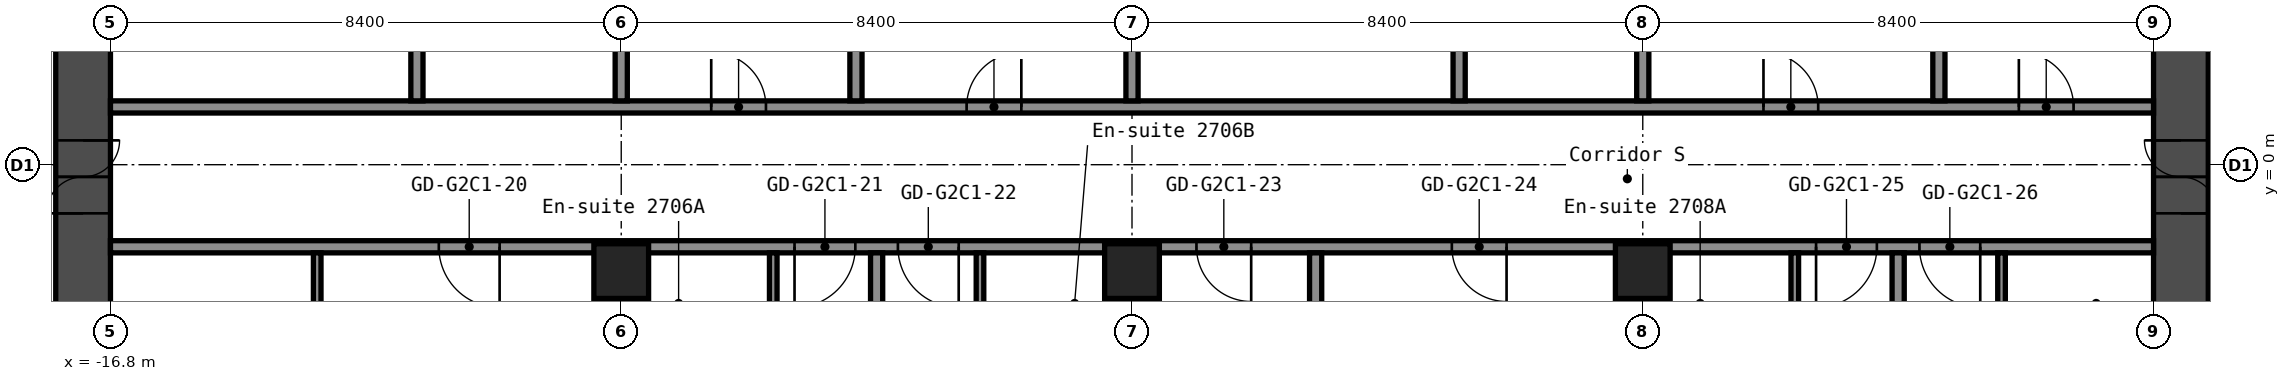
"""IFC4 building model, lengths in metres.
Left out: names, types, materials, properties, quantities, classifications, styles, units other than length and angle.
Written with IfcOpenShell. Run it as: python <this file> out.ifc"""

import sys

from ifc_helpers import new_model, si_unit, direction, frame, frame_2d, origin, origin_2d, place, context, subcontext, project, spatial, rectangle, hollow_rectangle, extrude, element, fill, save


model = new_model("IFC4")
c1 = context("Model", 3, precision=1e-05, world=origin(), true_north=direction((0.0, 1.0)))
c2 = subcontext(c1, "Body", "Model", "MODEL_VIEW")
j1 = project(units=[si_unit("LENGTHUNIT", "METRE"), si_unit("PLANEANGLEUNIT", "RADIAN")], contexts=[c1])
p1 = place(None, origin())
s1 = spatial("IfcSite", under=j1, at=p1, CompositionType="ELEMENT")
p2 = place(p1, origin())
s2 = spatial("IfcBuilding", under=s1, at=p2, CompositionType="ELEMENT")
p3 = place(p2, frame((0.0, 0.0, 97.8)))
s3 = spatial("IfcBuildingStorey", under=s2, at=p3, CompositionType="ELEMENT", Elevation=97.8)
for number, where, z_axis, x_axis in (
    (1, (-8.4, -1.75, 0.0), (0.0, 0.0, 1.0), (1.0, 0.0, 0.0)),
    (2, (0.0, -1.75, 0.0), (0.0, 0.0, 1.0), (1.0, 0.0, 0.0)),
    (3, (8.4, -1.75, 0.0), (0.0, 0.0, 1.0), (1.0, 0.0, 0.0)),
):
    element("IfcColumn", number, at=place(p3, frame(where, z_axis=z_axis, x_axis=x_axis)), inside=s3, PredefinedType="COLUMN", context=c2, shape_type="SweptSolid", body=[
        extrude(hollow_rectangle(XDim=0.9, YDim=0.9, WallThickness=0.036, at=origin_2d()), origin(), (0.0, 0.0, 1.0), 2.8),
    ])
p4 = place(p3, frame((-17.25, -8.4, 0.0), z_axis=(0.0, 0.0, 1.0), x_axis=(0.0, 1.0, 0.0)))
e4 = element("IfcWall", 4, at=p4, inside=s3, PredefinedType="SHEAR", context=c2, shape_type="SweptSolid", body=[
    extrude(rectangle(XDim=16.8, YDim=0.9, at=frame_2d((8.4, 0.0))), origin(), (0.0, 0.0, 1.0), 2.8),
])
p5 = place(p4, frame((7.6, 0.0, 0.0)))
e5 = element("IfcOpeningElement", 5, at=p5, cuts=e4, PredefinedType="OPENING", context=c2, shape_type="SweptSolid", body=[
    extrude(rectangle(XDim=1.2, YDim=2.1, at=frame_2d((0.6, 1.05))), frame((0.0, 0.46, 0.0), z_axis=(0.0, -1.0, 0.0), x_axis=(1.0, 0.0, 0.0)), (0.0, 0.0, 1.0), 0.92),
])
p6 = place(p3, frame((17.25, -8.4, 0.0), z_axis=(0.0, 0.0, 1.0), x_axis=(0.0, 1.0, 0.0)))
e6 = element("IfcWall", 6, at=p6, inside=s3, PredefinedType="SHEAR", context=c2, shape_type="SweptSolid", body=[
    extrude(rectangle(XDim=16.8, YDim=0.9, at=frame_2d((8.4, 0.0))), origin(), (0.0, 0.0, 1.0), 2.8),
])
p7 = place(p6, frame((7.6, 0.0, 0.0)))
e7 = element("IfcOpeningElement", 7, at=p7, cuts=e6, PredefinedType="OPENING", context=c2, shape_type="SweptSolid", body=[
    extrude(rectangle(XDim=1.2, YDim=2.1, at=frame_2d((0.6, 1.05))), frame((0.0, 0.46, 0.0), z_axis=(0.0, -1.0, 0.0), x_axis=(1.0, 0.0, 0.0)), (0.0, 0.0, 1.0), 0.92),
])
p8 = place(p3, frame((-16.8, -1.35, 0.0), z_axis=(0.0, 0.0, 1.0), x_axis=(1.0, 0.0, 0.0)))
e8 = element("IfcWall", 8, at=p8, inside=s3, PredefinedType="PARTITIONING", context=c2, shape_type="SweptSolid", body=[
    extrude(rectangle(XDim=33.6, YDim=0.2, at=frame_2d((16.8, 0.0))), origin(), (0.0, 0.0, 1.0), 2.8),
])
p9 = place(p8, frame((5.4, 0.0, 0.0)))
e9 = element("IfcOpeningElement", 9, at=p9, cuts=e8, PredefinedType="OPENING", context=c2, shape_type="SweptSolid", body=[
    extrude(rectangle(XDim=1.0, YDim=2.1, at=frame_2d((0.5, 1.05))), frame((0.0, 0.11, 0.0), z_axis=(0.0, -1.0, 0.0), x_axis=(1.0, 0.0, 0.0)), (0.0, 0.0, 1.0), 0.22),
])
p10 = place(p8, frame((11.25, 0.0, 0.0)))
e10 = element("IfcOpeningElement", 10, at=p10, cuts=e8, PredefinedType="OPENING", context=c2, shape_type="SweptSolid", body=[
    extrude(rectangle(XDim=1.0, YDim=2.1, at=frame_2d((0.5, 1.05))), frame((0.0, 0.11, 0.0), z_axis=(0.0, -1.0, 0.0), x_axis=(1.0, 0.0, 0.0)), (0.0, 0.0, 1.0), 0.22),
])
p11 = place(p8, frame((12.95, 0.0, 0.0)))
e11 = element("IfcOpeningElement", 11, at=p11, cuts=e8, PredefinedType="OPENING", context=c2, shape_type="SweptSolid", body=[
    extrude(rectangle(XDim=1.0, YDim=2.1, at=frame_2d((0.5, 1.05))), frame((0.0, 0.11, 0.0), z_axis=(0.0, -1.0, 0.0), x_axis=(1.0, 0.0, 0.0)), (0.0, 0.0, 1.0), 0.22),
])
p12 = place(p8, frame((17.86, 0.0, 0.0)))
e12 = element("IfcOpeningElement", 12, at=p12, cuts=e8, PredefinedType="OPENING", context=c2, shape_type="SweptSolid", body=[
    extrude(rectangle(XDim=0.9, YDim=2.1, at=frame_2d((0.45, 1.05))), frame((0.0, 0.11, 0.0), z_axis=(0.0, -1.0, 0.0), x_axis=(1.0, 0.0, 0.0)), (0.0, 0.0, 1.0), 0.22),
])
p13 = place(p8, frame((22.06, 0.0, 0.0)))
e13 = element("IfcOpeningElement", 13, at=p13, cuts=e8, PredefinedType="OPENING", context=c2, shape_type="SweptSolid", body=[
    extrude(rectangle(XDim=0.9, YDim=2.1, at=frame_2d((0.45, 1.05))), frame((0.0, 0.11, 0.0), z_axis=(0.0, -1.0, 0.0), x_axis=(1.0, 0.0, 0.0)), (0.0, 0.0, 1.0), 0.22),
])
p14 = place(p8, frame((28.05, 0.0, 0.0)))
e14 = element("IfcOpeningElement", 14, at=p14, cuts=e8, PredefinedType="OPENING", context=c2, shape_type="SweptSolid", body=[
    extrude(rectangle(XDim=1.0, YDim=2.1, at=frame_2d((0.5, 1.05))), frame((0.0, 0.11, 0.0), z_axis=(0.0, -1.0, 0.0), x_axis=(1.0, 0.0, 0.0)), (0.0, 0.0, 1.0), 0.22),
])
p15 = place(p8, frame((29.75, 0.0, 0.0)))
e15 = element("IfcOpeningElement", 15, at=p15, cuts=e8, PredefinedType="OPENING", context=c2, shape_type="SweptSolid", body=[
    extrude(rectangle(XDim=1.0, YDim=2.1, at=frame_2d((0.5, 1.05))), frame((0.0, 0.11, 0.0), z_axis=(0.0, -1.0, 0.0), x_axis=(1.0, 0.0, 0.0)), (0.0, 0.0, 1.0), 0.22),
])
p16 = place(p3, frame((-16.8, 0.95, 0.0), z_axis=(0.0, 0.0, 1.0), x_axis=(1.0, 0.0, 0.0)))
e16 = element("IfcWall", 16, at=p16, inside=s3, PredefinedType="PARTITIONING", context=c2, shape_type="SweptSolid", body=[
    extrude(rectangle(XDim=33.6, YDim=0.2, at=frame_2d((16.8, 0.0))), origin(), (0.0, 0.0, 1.0), 2.8),
])
p17 = place(p16, frame((9.88, 0.0, 0.0)))
e17 = element("IfcOpeningElement", 17, at=p17, cuts=e16, PredefinedType="OPENING", context=c2, shape_type="SweptSolid", body=[
    extrude(rectangle(XDim=0.9, YDim=2.1, at=frame_2d((0.45, 1.05))), frame((0.0, 0.11, 0.0), z_axis=(0.0, -1.0, 0.0), x_axis=(1.0, 0.0, 0.0)), (0.0, 0.0, 1.0), 0.22),
])
p18 = place(p16, frame((14.08, 0.0, 0.0)))
e18 = element("IfcOpeningElement", 18, at=p18, cuts=e16, PredefinedType="OPENING", context=c2, shape_type="SweptSolid", body=[
    extrude(rectangle(XDim=0.9, YDim=2.1, at=frame_2d((0.45, 1.05))), frame((0.0, 0.11, 0.0), z_axis=(0.0, -1.0, 0.0), x_axis=(1.0, 0.0, 0.0)), (0.0, 0.0, 1.0), 0.22),
])
p19 = place(p16, frame((27.185, 0.0, 0.0)))
e19 = element("IfcOpeningElement", 19, at=p19, cuts=e16, PredefinedType="OPENING", context=c2, shape_type="SweptSolid", body=[
    extrude(rectangle(XDim=0.9, YDim=2.1, at=frame_2d((0.45, 1.05))), frame((0.0, 0.11, 0.0), z_axis=(0.0, -1.0, 0.0), x_axis=(1.0, 0.0, 0.0)), (0.0, 0.0, 1.0), 0.22),
])
p20 = place(p16, frame((31.385, 0.0, 0.0)))
e20 = element("IfcOpeningElement", 20, at=p20, cuts=e16, PredefinedType="OPENING", context=c2, shape_type="SweptSolid", body=[
    extrude(rectangle(XDim=0.9, YDim=2.1, at=frame_2d((0.45, 1.05))), frame((0.0, 0.11, 0.0), z_axis=(0.0, -1.0, 0.0), x_axis=(1.0, 0.0, 0.0)), (0.0, 0.0, 1.0), 0.22),
])
p21 = place(p3, frame((-13.4, -4.75, 0.0), z_axis=(0.0, 0.0, 1.0), x_axis=(0.0, 1.0, 0.0)))
e21 = element("IfcWall", 21, at=p21, inside=s3, PredefinedType="PARTITIONING", context=c2, shape_type="SweptSolid", body=[
    extrude(rectangle(XDim=3.3, YDim=0.125, at=frame_2d((1.65, 0.0))), origin(), (0.0, 0.0, 1.0), 2.8),
])
p22 = place(p3, frame((-11.76, 1.05, 0.0), z_axis=(0.0, 0.0, 1.0), x_axis=(0.0, 1.0, 0.0)))
e22 = element("IfcWall", 22, at=p22, inside=s3, PredefinedType="PARTITIONING", context=c2, shape_type="SweptSolid", body=[
    extrude(rectangle(XDim=5.9, YDim=0.2, at=frame_2d((2.95, 0.0))), origin(), (0.0, 0.0, 1.0), 2.8),
])
p23 = place(p3, frame((-8.4, -15.55, 0.0), z_axis=(0.0, 0.0, 1.0), x_axis=(0.0, 1.0, 0.0)))
e23 = element("IfcWall", 23, at=p23, inside=s3, PredefinedType="PARTITIONING", context=c2, shape_type="SweptSolid", body=[
    extrude(rectangle(XDim=13.36, YDim=0.2, at=frame_2d((6.68, 0.0))), origin(), (0.0, 0.0, 1.0), 2.8),
])
p24 = place(p3, frame((-8.4, 1.05, 0.0), z_axis=(0.0, 0.0, 1.0), x_axis=(0.0, 1.0, 0.0)))
e24 = element("IfcWall", 24, at=p24, inside=s3, PredefinedType="PARTITIONING", context=c2, shape_type="SweptSolid", body=[
    extrude(rectangle(XDim=5.9, YDim=0.2, at=frame_2d((2.95, 0.0))), origin(), (0.0, 0.0, 1.0), 2.8),
])
p25 = place(p3, frame((-5.9, -4.35, 0.0), z_axis=(0.0, 0.0, 1.0), x_axis=(0.0, 1.0, 0.0)))
e25 = element("IfcWall", 25, at=p25, inside=s3, PredefinedType="PARTITIONING", context=c2, shape_type="SweptSolid", body=[
    extrude(rectangle(XDim=2.9, YDim=0.125, at=frame_2d((1.45, 0.0))), origin(), (0.0, 0.0, 1.0), 2.8),
])
p26 = place(p25, frame((0.6, 0.0, 0.0)))
e26 = element("IfcOpeningElement", 26, at=p26, cuts=e25, PredefinedType="OPENING", context=c2, shape_type="SweptSolid", body=[
    extrude(rectangle(XDim=0.8, YDim=2.1, at=frame_2d((0.4, 1.05))), frame((0.0, 0.073, 0.0), z_axis=(0.0, -1.0, 0.0), x_axis=(1.0, 0.0, 0.0)), (0.0, 0.0, 1.0), 0.145),
])
p27 = place(p3, frame((-4.54, 1.05, 0.0), z_axis=(0.0, 0.0, 1.0), x_axis=(0.0, 1.0, 0.0)))
e27 = element("IfcWall", 27, at=p27, inside=s3, PredefinedType="PARTITIONING", context=c2, shape_type="SweptSolid", body=[
    extrude(rectangle(XDim=5.9, YDim=0.2, at=frame_2d((2.95, 0.0))), origin(), (0.0, 0.0, 1.0), 2.8),
])
p28 = place(p3, frame((-4.2, -15.55, 0.0), z_axis=(0.0, 0.0, 1.0), x_axis=(0.0, 1.0, 0.0)))
e28 = element("IfcWall", 28, at=p28, inside=s3, PredefinedType="PARTITIONING", context=c2, shape_type="SweptSolid", body=[
    extrude(rectangle(XDim=14.1, YDim=0.2, at=frame_2d((7.05, 0.0))), origin(), (0.0, 0.0, 1.0), 2.8),
])
p29 = place(p3, frame((-2.5, -4.35, 0.0), z_axis=(0.0, 0.0, 1.0), x_axis=(0.0, 1.0, 0.0)))
e29 = element("IfcWall", 29, at=p29, inside=s3, PredefinedType="PARTITIONING", context=c2, shape_type="SweptSolid", body=[
    extrude(rectangle(XDim=2.9, YDim=0.125, at=frame_2d((1.45, 0.0))), origin(), (0.0, 0.0, 1.0), 2.8),
])
p30 = place(p29, frame((0.6, 0.0, 0.0)))
e30 = element("IfcOpeningElement", 30, at=p30, cuts=e29, PredefinedType="OPENING", context=c2, shape_type="SweptSolid", body=[
    extrude(rectangle(XDim=0.8, YDim=2.1, at=frame_2d((0.4, 1.05))), frame((0.0, 0.073, 0.0), z_axis=(0.0, -1.0, 0.0), x_axis=(1.0, 0.0, 0.0)), (0.0, 0.0, 1.0), 0.145),
])
p31 = place(p3, frame((0.0, -15.55, 0.0), z_axis=(0.0, 0.0, 1.0), x_axis=(0.0, 1.0, 0.0)))
e31 = element("IfcWall", 31, at=p31, inside=s3, PredefinedType="PARTITIONING", context=c2, shape_type="SweptSolid", body=[
    extrude(rectangle(XDim=13.36, YDim=0.2, at=frame_2d((6.68, 0.0))), origin(), (0.0, 0.0, 1.0), 2.8),
])
p32 = place(p3, frame((0.0, 1.05, 0.0), z_axis=(0.0, 0.0, 1.0), x_axis=(0.0, 1.0, 0.0)))
e32 = element("IfcWall", 32, at=p32, inside=s3, PredefinedType="PARTITIONING", context=c2, shape_type="SweptSolid", body=[
    extrude(rectangle(XDim=5.9, YDim=0.2, at=frame_2d((2.95, 0.0))), origin(), (0.0, 0.0, 1.0), 2.8),
])
p33 = place(p3, frame((3.02, -15.55, 0.0), z_axis=(0.0, 0.0, 1.0), x_axis=(0.0, 1.0, 0.0)))
e33 = element("IfcWall", 33, at=p33, inside=s3, PredefinedType="PARTITIONING", context=c2, shape_type="SweptSolid", body=[
    extrude(rectangle(XDim=14.1, YDim=0.2, at=frame_2d((7.05, 0.0))), origin(), (0.0, 0.0, 1.0), 2.8),
])
p34 = place(p3, frame((5.38, 1.05, 0.0), z_axis=(0.0, 0.0, 1.0), x_axis=(0.0, 1.0, 0.0)))
e34 = element("IfcWall", 34, at=p34, inside=s3, PredefinedType="PARTITIONING", context=c2, shape_type="SweptSolid", body=[
    extrude(rectangle(XDim=5.9, YDim=0.2, at=frame_2d((2.95, 0.0))), origin(), (0.0, 0.0, 1.0), 2.8),
])
p35 = place(p3, frame((8.4, -15.55, 0.0), z_axis=(0.0, 0.0, 1.0), x_axis=(0.0, 1.0, 0.0)))
e35 = element("IfcWall", 35, at=p35, inside=s3, PredefinedType="PARTITIONING", context=c2, shape_type="SweptSolid", body=[
    extrude(rectangle(XDim=13.36, YDim=0.2, at=frame_2d((6.68, 0.0))), origin(), (0.0, 0.0, 1.0), 2.8),
])
p36 = place(p3, frame((8.4, 1.05, 0.0), z_axis=(0.0, 0.0, 1.0), x_axis=(0.0, 1.0, 0.0)))
e36 = element("IfcWall", 36, at=p36, inside=s3, PredefinedType="PARTITIONING", context=c2, shape_type="SweptSolid", body=[
    extrude(rectangle(XDim=5.9, YDim=0.2, at=frame_2d((2.95, 0.0))), origin(), (0.0, 0.0, 1.0), 2.8),
])
p37 = place(p3, frame((10.9, -4.35, 0.0), z_axis=(0.0, 0.0, 1.0), x_axis=(0.0, 1.0, 0.0)))
e37 = element("IfcWall", 37, at=p37, inside=s3, PredefinedType="PARTITIONING", context=c2, shape_type="SweptSolid", body=[
    extrude(rectangle(XDim=2.9, YDim=0.125, at=frame_2d((1.45, 0.0))), origin(), (0.0, 0.0, 1.0), 2.8),
])
p38 = place(p37, frame((0.6, 0.0, 0.0)))
e38 = element("IfcOpeningElement", 38, at=p38, cuts=e37, PredefinedType="OPENING", context=c2, shape_type="SweptSolid", body=[
    extrude(rectangle(XDim=0.8, YDim=2.1, at=frame_2d((0.4, 1.05))), frame((0.0, 0.073, 0.0), z_axis=(0.0, -1.0, 0.0), x_axis=(1.0, 0.0, 0.0)), (0.0, 0.0, 1.0), 0.145),
])
p39 = place(p3, frame((12.6, -15.55, 0.0), z_axis=(0.0, 0.0, 1.0), x_axis=(0.0, 1.0, 0.0)))
e39 = element("IfcWall", 39, at=p39, inside=s3, PredefinedType="PARTITIONING", context=c2, shape_type="SweptSolid", body=[
    extrude(rectangle(XDim=14.1, YDim=0.2, at=frame_2d((7.05, 0.0))), origin(), (0.0, 0.0, 1.0), 2.8),
])
p40 = place(p3, frame((13.27, 1.05, 0.0), z_axis=(0.0, 0.0, 1.0), x_axis=(0.0, 1.0, 0.0)))
e40 = element("IfcWall", 40, at=p40, inside=s3, PredefinedType="PARTITIONING", context=c2, shape_type="SweptSolid", body=[
    extrude(rectangle(XDim=5.9, YDim=0.2, at=frame_2d((2.95, 0.0))), origin(), (0.0, 0.0, 1.0), 2.8),
])
p41 = place(p3, frame((14.3, -4.35, 0.0), z_axis=(0.0, 0.0, 1.0), x_axis=(0.0, 1.0, 0.0)))
e41 = element("IfcWall", 41, at=p41, inside=s3, PredefinedType="PARTITIONING", context=c2, shape_type="SweptSolid", body=[
    extrude(rectangle(XDim=2.9, YDim=0.125, at=frame_2d((1.45, 0.0))), origin(), (0.0, 0.0, 1.0), 2.8),
])
p42 = place(p41, frame((0.6, 0.0, 0.0)))
e42 = element("IfcOpeningElement", 42, at=p42, cuts=e41, PredefinedType="OPENING", context=c2, shape_type="SweptSolid", body=[
    extrude(rectangle(XDim=0.8, YDim=2.1, at=frame_2d((0.4, 1.05))), frame((0.0, 0.073, 0.0), z_axis=(0.0, -1.0, 0.0), x_axis=(1.0, 0.0, 0.0)), (0.0, 0.0, 1.0), 0.145),
])
p43 = place(p5, origin())
e43 = element("IfcDoor", 43, at=p43, inside=s3, OperationType="DOUBLE_DOOR_SINGLE_SWING", PredefinedType="DOOR", context=c2, shape_type="SweptSolid", body=[
    extrude(rectangle(XDim=1.2, YDim=2.1, at=frame_2d((0.6, 1.05))), frame((0.0, 0.025, 0.0), z_axis=(0.0, -1.0, 0.0), x_axis=(1.0, 0.0, 0.0)), (0.0, 0.0, 1.0), 0.05),
])
fill(e5, e43)
p44 = place(p7, origin())
e44 = element("IfcDoor", 44, at=p44, inside=s3, OperationType="DOUBLE_DOOR_SINGLE_SWING", PredefinedType="DOOR", context=c2, shape_type="SweptSolid", body=[
    extrude(rectangle(XDim=1.2, YDim=2.1, at=frame_2d((0.6, 1.05))), frame((0.0, 0.025, 0.0), z_axis=(0.0, -1.0, 0.0), x_axis=(1.0, 0.0, 0.0)), (0.0, 0.0, 1.0), 0.05),
])
fill(e7, e44)
p45 = place(p9, origin())
e45 = element("IfcDoor", 45, at=p45, inside=s3, OperationType="SINGLE_SWING_RIGHT", PredefinedType="DOOR", context=c2, shape_type="SweptSolid", body=[
    extrude(rectangle(XDim=1.0, YDim=2.1, at=frame_2d((0.5, 1.05))), frame((0.0, 0.025, 0.0), z_axis=(0.0, -1.0, 0.0), x_axis=(1.0, 0.0, 0.0)), (0.0, 0.0, 1.0), 0.05),
])
fill(e9, e45)
p46 = place(p10, origin())
e46 = element("IfcDoor", 46, at=p46, inside=s3, OperationType="SINGLE_SWING_LEFT", PredefinedType="DOOR", context=c2, shape_type="SweptSolid", body=[
    extrude(rectangle(XDim=1.0, YDim=2.1, at=frame_2d((0.5, 1.05))), frame((0.0, 0.025, 0.0), z_axis=(0.0, -1.0, 0.0), x_axis=(1.0, 0.0, 0.0)), (0.0, 0.0, 1.0), 0.05),
])
fill(e10, e46)
p47 = place(p11, origin())
e47 = element("IfcDoor", 47, at=p47, inside=s3, OperationType="SINGLE_SWING_RIGHT", PredefinedType="DOOR", context=c2, shape_type="SweptSolid", body=[
    extrude(rectangle(XDim=1.0, YDim=2.1, at=frame_2d((0.5, 1.05))), frame((0.0, 0.025, 0.0), z_axis=(0.0, -1.0, 0.0), x_axis=(1.0, 0.0, 0.0)), (0.0, 0.0, 1.0), 0.05),
])
fill(e11, e47)
p48 = place(p12, origin())
e48 = element("IfcDoor", 48, at=p48, inside=s3, OperationType="SINGLE_SWING_RIGHT", PredefinedType="DOOR", context=c2, shape_type="SweptSolid", body=[
    extrude(rectangle(XDim=0.9, YDim=2.1, at=frame_2d((0.45, 1.05))), frame((0.0, 0.025, 0.0), z_axis=(0.0, -1.0, 0.0), x_axis=(1.0, 0.0, 0.0)), (0.0, 0.0, 1.0), 0.05),
])
fill(e12, e48)
p49 = place(p13, origin())
e49 = element("IfcDoor", 49, at=p49, inside=s3, OperationType="SINGLE_SWING_RIGHT", PredefinedType="DOOR", context=c2, shape_type="SweptSolid", body=[
    extrude(rectangle(XDim=0.9, YDim=2.1, at=frame_2d((0.45, 1.05))), frame((0.0, 0.025, 0.0), z_axis=(0.0, -1.0, 0.0), x_axis=(1.0, 0.0, 0.0)), (0.0, 0.0, 1.0), 0.05),
])
fill(e13, e49)
p50 = place(p14, origin())
e50 = element("IfcDoor", 50, at=p50, inside=s3, OperationType="SINGLE_SWING_LEFT", PredefinedType="DOOR", context=c2, shape_type="SweptSolid", body=[
    extrude(rectangle(XDim=1.0, YDim=2.1, at=frame_2d((0.5, 1.05))), frame((0.0, 0.025, 0.0), z_axis=(0.0, -1.0, 0.0), x_axis=(1.0, 0.0, 0.0)), (0.0, 0.0, 1.0), 0.05),
])
fill(e14, e50)
p51 = place(p15, origin())
e51 = element("IfcDoor", 51, at=p51, inside=s3, OperationType="SINGLE_SWING_RIGHT", PredefinedType="DOOR", context=c2, shape_type="SweptSolid", body=[
    extrude(rectangle(XDim=1.0, YDim=2.1, at=frame_2d((0.5, 1.05))), frame((0.0, 0.025, 0.0), z_axis=(0.0, -1.0, 0.0), x_axis=(1.0, 0.0, 0.0)), (0.0, 0.0, 1.0), 0.05),
])
fill(e15, e51)
p52 = place(p17, origin())
e52 = element("IfcDoor", 52, at=p52, inside=s3, OperationType="SINGLE_SWING_RIGHT", PredefinedType="DOOR", context=c2, shape_type="SweptSolid", body=[
    extrude(rectangle(XDim=0.9, YDim=2.1, at=frame_2d((0.45, 1.05))), frame((0.0, 0.025, 0.0), z_axis=(0.0, -1.0, 0.0), x_axis=(1.0, 0.0, 0.0)), (0.0, 0.0, 1.0), 0.05),
])
fill(e17, e52)
p53 = place(p18, origin())
e53 = element("IfcDoor", 53, at=p53, inside=s3, OperationType="SINGLE_SWING_LEFT", PredefinedType="DOOR", context=c2, shape_type="SweptSolid", body=[
    extrude(rectangle(XDim=0.9, YDim=2.1, at=frame_2d((0.45, 1.05))), frame((0.0, 0.025, 0.0), z_axis=(0.0, -1.0, 0.0), x_axis=(1.0, 0.0, 0.0)), (0.0, 0.0, 1.0), 0.05),
])
fill(e18, e53)
p54 = place(p19, origin())
e54 = element("IfcDoor", 54, at=p54, inside=s3, OperationType="SINGLE_SWING_RIGHT", PredefinedType="DOOR", context=c2, shape_type="SweptSolid", body=[
    extrude(rectangle(XDim=0.9, YDim=2.1, at=frame_2d((0.45, 1.05))), frame((0.0, 0.025, 0.0), z_axis=(0.0, -1.0, 0.0), x_axis=(1.0, 0.0, 0.0)), (0.0, 0.0, 1.0), 0.05),
])
fill(e19, e54)
p55 = place(p20, origin())
e55 = element("IfcDoor", 55, at=p55, inside=s3, OperationType="SINGLE_SWING_RIGHT", PredefinedType="DOOR", context=c2, shape_type="SweptSolid", body=[
    extrude(rectangle(XDim=0.9, YDim=2.1, at=frame_2d((0.45, 1.05))), frame((0.0, 0.025, 0.0), z_axis=(0.0, -1.0, 0.0), x_axis=(1.0, 0.0, 0.0)), (0.0, 0.0, 1.0), 0.05),
])
fill(e20, e55)
save(model, sys.argv[1])
